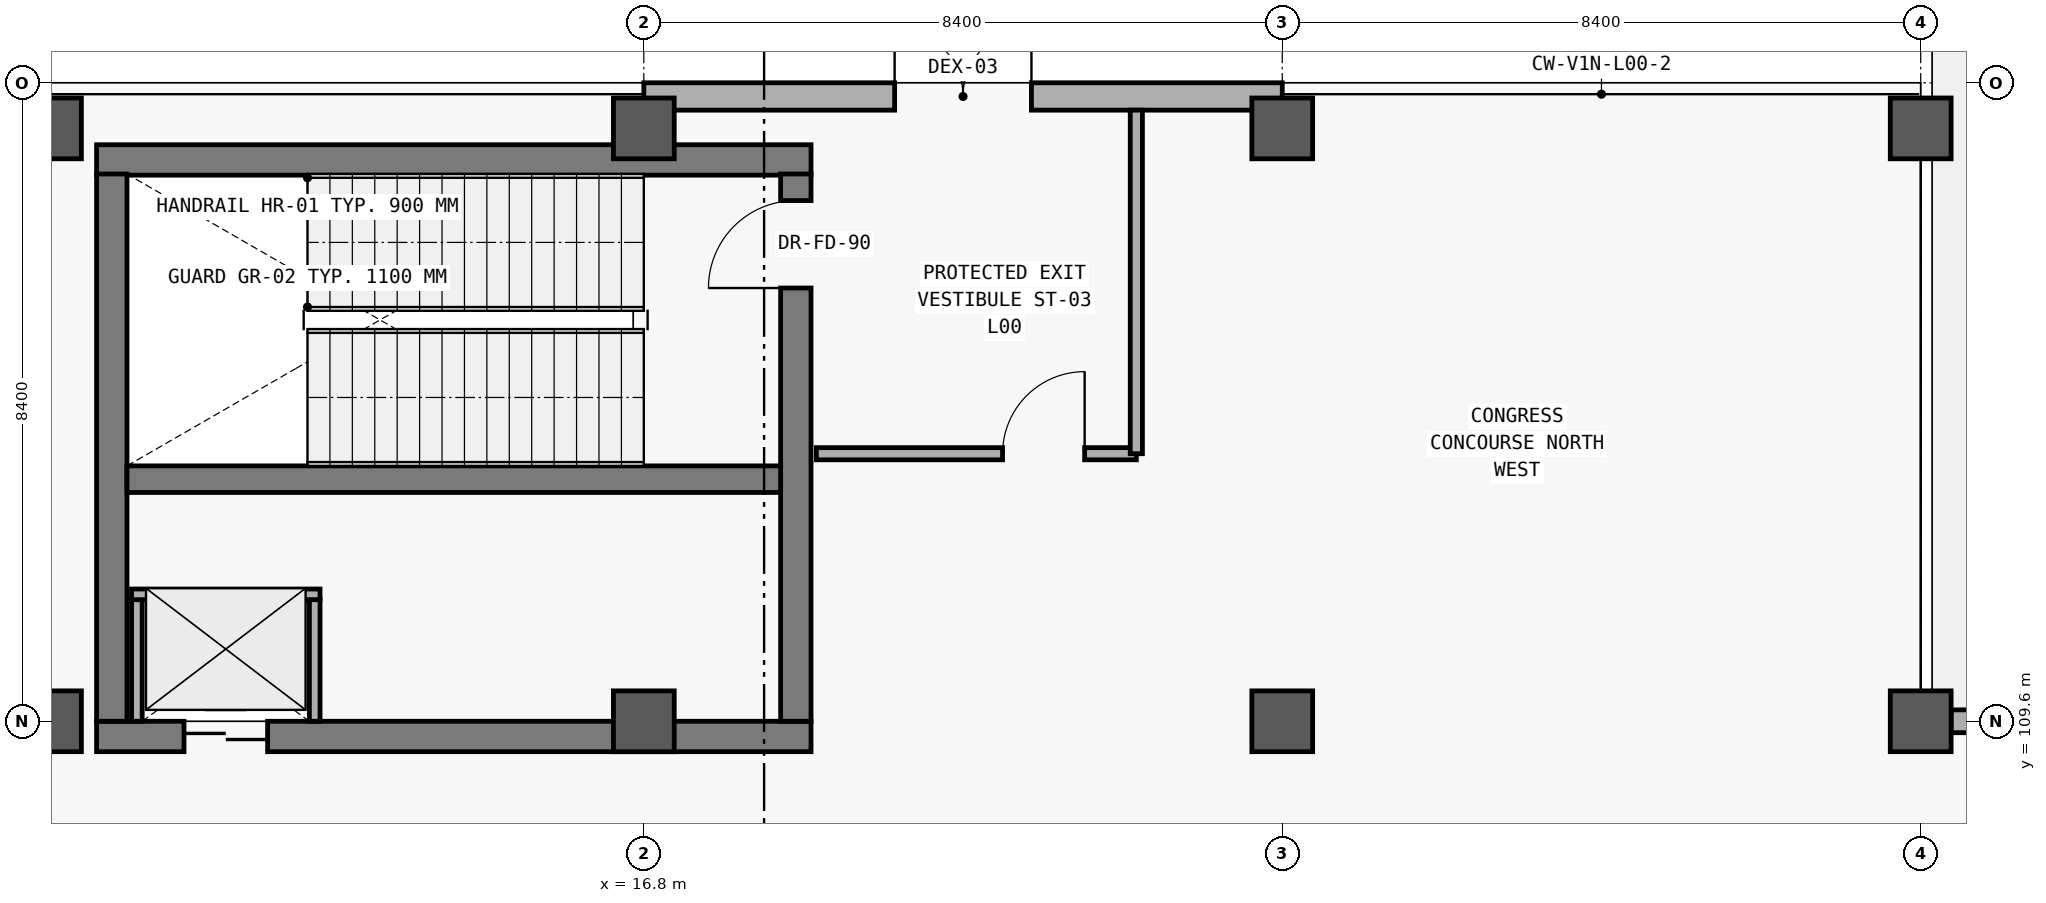
"""IFC4 building model, lengths in metres.
Left out: names, types, materials, properties, quantities, classifications, styles, units other than length and angle.
Written with IfcOpenShell. Run it as: python <this file> out.ifc"""

import sys

from ifc_helpers import new_model, si_unit, direction, frame, frame_2d, origin, origin_2d, place, context, subcontext, project, spatial, rectangle, extrude, element, fill, save


model = new_model("IFC4")
c1 = context("Model", 3, precision=1e-05, world=origin(), true_north=direction((0.0, 1.0)))
c2 = subcontext(c1, "Body", "Model", "MODEL_VIEW")
j1 = project(units=[si_unit("LENGTHUNIT", "METRE"), si_unit("PLANEANGLEUNIT", "RADIAN")], contexts=[c1])
p1 = place(None, origin())
s1 = spatial("IfcSite", under=j1, at=p1, CompositionType="ELEMENT")
p2 = place(p1, origin())
s2 = spatial("IfcBuilding", under=s1, at=p2, CompositionType="ELEMENT")
p3 = place(p2, origin())
s3 = spatial("IfcBuildingStorey", under=s2, at=p3, CompositionType="ELEMENT", Elevation=0.0)
for number, where, z_axis, x_axis in (
    (1, (9.0, 109.6, 0.0), (0.0, 0.0, 1.0), (1.0, 0.0, 0.0)),
    (2, (9.0, 117.4, 0.0), (0.0, 0.0, 1.0), (1.0, 0.0, 0.0)),
    (3, (16.8, 109.6, 0.0), (0.0, 0.0, 1.0), (1.0, 0.0, 0.0)),
    (4, (16.8, 117.4, 0.0), (0.0, 0.0, 1.0), (1.0, 0.0, 0.0)),
    (5, (25.2, 109.6, 0.0), (0.0, 0.0, 1.0), (1.0, 0.0, 0.0)),
    (6, (25.2, 117.4, 0.0), (0.0, 0.0, 1.0), (1.0, 0.0, 0.0)),
    (7, (33.6, 109.6, 0.0), (0.0, 0.0, 1.0), (1.0, 0.0, 0.0)),
    (8, (33.6, 117.4, 0.0), (0.0, 0.0, 1.0), (1.0, 0.0, 0.0)),
):
    element("IfcColumn", number, at=place(p3, frame(where, z_axis=z_axis, x_axis=x_axis)), inside=s3, PredefinedType="COLUMN", context=c2, shape_type="SweptSolid", body=[
        extrude(rectangle(XDim=0.8, YDim=0.8, at=origin_2d()), origin(), (0.0, 0.0, 1.0), 5.4),
    ])
p4 = place(p3, frame((16.8, 117.82, 0.0), z_axis=(0.0, 0.0, 1.0), x_axis=(1.0, 0.0, 0.0)))
e9 = element("IfcWall", 9, at=p4, inside=s3, PredefinedType="SOLIDWALL", context=c2, shape_type="SweptSolid", body=[
    extrude(rectangle(XDim=8.4, YDim=0.36, at=frame_2d((4.2, 0.0))), origin(), (0.0, 0.0, 1.0), 5.08),
])
p5 = place(p4, frame((3.3, 0.0, 0.0)))
e10 = element("IfcOpeningElement", 10, at=p5, cuts=e9, PredefinedType="OPENING", context=c2, shape_type="SweptSolid", body=[
    extrude(rectangle(XDim=1.8, YDim=2.4, at=frame_2d((0.9, 1.2))), frame((0.0, 0.19, 0.0), z_axis=(0.0, -1.0, 0.0), x_axis=(1.0, 0.0, 0.0)), (0.0, 0.0, 1.0), 0.38),
])
p6 = place(p3, frame((34.0, 109.6, 0.0), z_axis=(0.0, 0.0, 1.0), x_axis=(1.0, 0.0, 0.0)))
e11 = element("IfcWall", 11, at=p6, inside=s3, PredefinedType="SOLIDWALL", context=c2, shape_type="SweptSolid", body=[
    extrude(rectangle(XDim=7.6, YDim=0.3, at=frame_2d((3.8, 0.0))), origin(), (0.0, 0.0, 1.0), 4.58),
])
p7 = place(p6, frame((2.7, 0.0, 0.0)))
e12 = element("IfcOpeningElement", 12, at=p7, cuts=e11, PredefinedType="OPENING", context=c2, shape_type="SweptSolid", body=[
    extrude(rectangle(XDim=2.2, YDim=2.8, at=frame_2d((1.1, 1.4))), frame((0.0, 0.16, 0.0), z_axis=(0.0, -1.0, 0.0), x_axis=(1.0, 0.0, 0.0)), (0.0, 0.0, 1.0), 0.32),
])
p8 = place(p6, frame((0.35, 0.0, 0.6)))
e13 = element("IfcOpeningElement", 13, at=p8, cuts=e11, PredefinedType="OPENING", context=c2, shape_type="SweptSolid", body=[
    extrude(rectangle(XDim=1.8, YDim=2.1, at=frame_2d((0.9, 1.05))), frame((0.0, 0.16, 0.0), z_axis=(0.0, -1.0, 0.0), x_axis=(1.0, 0.0, 0.0)), (0.0, 0.0, 1.0), 0.32),
])
p9 = place(p6, frame((5.45, 0.0, 0.6)))
e14 = element("IfcOpeningElement", 14, at=p9, cuts=e11, PredefinedType="OPENING", context=c2, shape_type="SweptSolid", body=[
    extrude(rectangle(XDim=1.8, YDim=2.1, at=frame_2d((0.9, 1.05))), frame((0.0, 0.16, 0.0), z_axis=(0.0, -1.0, 0.0), x_axis=(1.0, 0.0, 0.0)), (0.0, 0.0, 1.0), 0.32),
])
p10 = place(p3, frame((9.6, 109.4, 0.0), z_axis=(0.0, 0.0, 1.0), x_axis=(1.0, 0.0, 0.0)))
e15 = element("IfcWall", 15, at=p10, inside=s3, PredefinedType="SHEAR", context=c2, shape_type="SweptSolid", body=[
    extrude(rectangle(XDim=9.4, YDim=0.4, at=frame_2d((4.7, 0.0))), origin(), (0.0, 0.0, 1.0), 5.08),
])
p11 = place(p10, frame((1.15, 0.0, 0.0)))
e16 = element("IfcOpeningElement", 16, at=p11, cuts=e15, PredefinedType="OPENING", context=c2, shape_type="SweptSolid", body=[
    extrude(rectangle(XDim=1.1, YDim=2.2, at=frame_2d((0.55, 1.1))), frame((0.0, 0.21, 0.0), z_axis=(0.0, -1.0, 0.0), x_axis=(1.0, 0.0, 0.0)), (0.0, 0.0, 1.0), 0.42),
])
p12 = place(p3, frame((19.0, 116.985, 0.0), z_axis=(0.0, 0.0, 1.0), x_axis=(-1.0, 0.0, 0.0)))
e17 = element("IfcWall", 17, at=p12, inside=s3, PredefinedType="SHEAR", context=c2, shape_type="SweptSolid", body=[
    extrude(rectangle(XDim=9.4, YDim=0.4, at=frame_2d((4.7, 0.0))), origin(), (0.0, 0.0, 1.0), 5.08),
])
p13 = place(p3, frame((9.8, 116.8, 0.0), z_axis=(0.0, 0.0, 1.0), x_axis=(0.0, -1.0, 0.0)))
e18 = element("IfcWall", 18, at=p13, inside=s3, PredefinedType="SHEAR", context=c2, shape_type="SweptSolid", body=[
    extrude(rectangle(XDim=7.2, YDim=0.4, at=frame_2d((3.6, 0.0))), origin(), (0.0, 0.0, 1.0), 5.08),
])
p14 = place(p3, frame((18.8, 109.6, 0.0), z_axis=(0.0, 0.0, 1.0), x_axis=(0.0, 1.0, 0.0)))
e19 = element("IfcWall", 19, at=p14, inside=s3, PredefinedType="SHEAR", context=c2, shape_type="SweptSolid", body=[
    extrude(rectangle(XDim=7.2, YDim=0.4, at=frame_2d((3.6, 0.0))), origin(), (0.0, 0.0, 1.0), 5.08),
])
p15 = place(p14, frame((5.7, 0.0, 0.0)))
e20 = element("IfcOpeningElement", 20, at=p15, cuts=e19, PredefinedType="OPENING", context=c2, shape_type="SweptSolid", body=[
    extrude(rectangle(XDim=1.15, YDim=2.2, at=frame_2d((0.575, 1.1))), frame((0.0, 0.21, 0.0), z_axis=(0.0, -1.0, 0.0), x_axis=(1.0, 0.0, 0.0)), (0.0, 0.0, 1.0), 0.42),
])
p16 = place(p3, frame((10.0, 112.785, 0.0), z_axis=(0.0, 0.0, 1.0), x_axis=(1.0, 0.0, 0.0)))
e21 = element("IfcWall", 21, at=p16, inside=s3, PredefinedType="SHEAR", context=c2, shape_type="SweptSolid", body=[
    extrude(rectangle(XDim=8.6, YDim=0.35, at=frame_2d((4.3, 0.0))), origin(), (0.0, 0.0, 1.0), 5.08),
])
for number, where, z_axis, x_axis in (
    (22, (10.13, 109.6, 0.0), (0.0, 0.0, 1.0), (0.0, 1.0, 0.0)),
    (23, (12.47, 109.6, 0.0), (0.0, 0.0, 1.0), (0.0, 1.0, 0.0)),
):
    element("IfcWall", number, at=place(p3, frame(where, z_axis=z_axis, x_axis=x_axis)), inside=s3, PredefinedType="PARTITIONING", context=c2, shape_type="SweptSolid", body=[
        extrude(rectangle(XDim=1.6, YDim=0.14, at=frame_2d((0.8, 0.0))), origin(), (0.0, 0.0, 1.0), 4.23),
    ])
p17 = place(p3, frame((10.06, 111.27, 0.0), z_axis=(0.0, 0.0, 1.0), x_axis=(1.0, 0.0, 0.0)))
e24 = element("IfcWall", 24, at=p17, inside=s3, PredefinedType="PARTITIONING", context=c2, shape_type="SweptSolid", body=[
    extrude(rectangle(XDim=2.48, YDim=0.14, at=frame_2d((1.24, 0.0))), origin(), (0.0, 0.0, 1.0), 4.23),
])
p18 = place(p3, frame((19.07, 113.12, 0.0), z_axis=(0.0, 0.0, 1.0), x_axis=(1.0, 0.0, 0.0)))
e25 = element("IfcWall", 25, at=p18, inside=s3, PredefinedType="PARTITIONING", context=c2, shape_type="SweptSolid", body=[
    extrude(rectangle(XDim=4.21, YDim=0.16, at=frame_2d((2.105, 0.0))), origin(), (0.0, 0.0, 1.0), 4.18),
])
p19 = place(p18, frame((2.45, 0.0, 0.0)))
e26 = element("IfcOpeningElement", 26, at=p19, cuts=e25, PredefinedType="OPENING", context=c2, shape_type="SweptSolid", body=[
    extrude(rectangle(XDim=1.08, YDim=2.25, at=frame_2d((0.54, 1.125))), frame((0.0, 0.09, 0.0), z_axis=(0.0, -1.0, 0.0), x_axis=(1.0, 0.0, 0.0)), (0.0, 0.0, 1.0), 0.18),
])
p20 = place(p3, frame((23.28, 113.12, 0.0), z_axis=(0.0, 0.0, 1.0), x_axis=(0.0, 1.0, 0.0)))
e27 = element("IfcWall", 27, at=p20, inside=s3, PredefinedType="PARTITIONING", context=c2, shape_type="SweptSolid", body=[
    extrude(rectangle(XDim=4.52, YDim=0.16, at=frame_2d((2.26, 0.0))), origin(), (0.0, 0.0, 1.0), 4.18),
])
p21 = place(p5, origin())
e28 = element("IfcDoor", 28, at=p21, inside=s3, OperationType="DOUBLE_DOOR_SINGLE_SWING", PredefinedType="DOOR", context=c2, shape_type="SweptSolid", body=[
    extrude(rectangle(XDim=1.8, YDim=2.4, at=frame_2d((0.9, 1.2))), frame((0.0, 0.025, 0.0), z_axis=(0.0, -1.0, 0.0), x_axis=(1.0, 0.0, 0.0)), (0.0, 0.0, 1.0), 0.05),
])
fill(e10, e28)
p22 = place(p15, origin())
e29 = element("IfcDoor", 29, at=p22, inside=s3, OperationType="SINGLE_SWING_LEFT", PredefinedType="DOOR", context=c2, shape_type="SweptSolid", body=[
    extrude(rectangle(XDim=1.15, YDim=2.2, at=frame_2d((0.575, 1.1))), frame((0.0, 0.025, 0.0), z_axis=(0.0, -1.0, 0.0), x_axis=(1.0, 0.0, 0.0)), (0.0, 0.0, 1.0), 0.05),
])
fill(e20, e29)
p23 = place(p11, origin())
e30 = element("IfcDoor", 30, at=p23, inside=s3, OperationType="DOUBLE_DOOR_SLIDING", PredefinedType="DOOR", context=c2, shape_type="SweptSolid", body=[
    extrude(rectangle(XDim=1.1, YDim=2.2, at=frame_2d((0.55, 1.1))), frame((0.0, 0.025, 0.0), z_axis=(0.0, -1.0, 0.0), x_axis=(1.0, 0.0, 0.0)), (0.0, 0.0, 1.0), 0.05),
])
fill(e16, e30)
p24 = place(p19, origin())
e31 = element("IfcDoor", 31, at=p24, inside=s3, OperationType="SINGLE_SWING_RIGHT", PredefinedType="DOOR", context=c2, shape_type="SweptSolid", body=[
    extrude(rectangle(XDim=1.08, YDim=2.25, at=frame_2d((0.54, 1.125))), frame((0.0, 0.025, 0.0), z_axis=(0.0, -1.0, 0.0), x_axis=(1.0, 0.0, 0.0)), (0.0, 0.0, 1.0), 0.05),
])
fill(e26, e31)
save(model, sys.argv[1])
